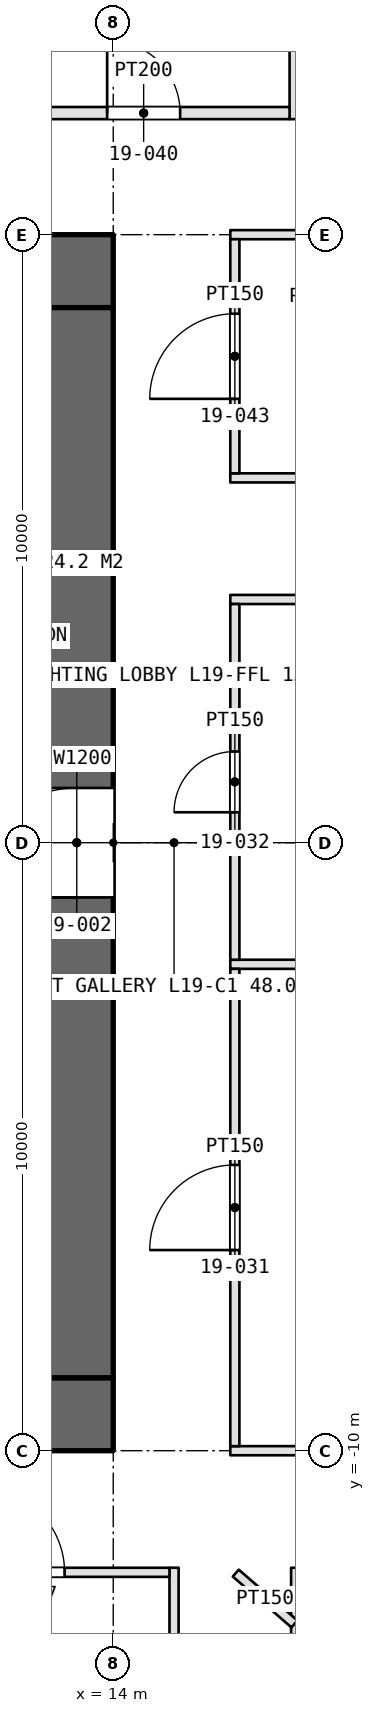
"""IFC4 building model, lengths in metres.
Left out: names, types, materials, properties, quantities, classifications, styles, units other than length and angle.
Written with IfcOpenShell. Run it as: python <this file> out.ifc"""

import sys

from ifc_helpers import new_model, si_unit, direction, frame, frame_2d, origin, place, context, subcontext, project, spatial, rectangle, extrude, element, fill, save


model = new_model("IFC4")
c1 = context("Model", 3, precision=1e-05, world=origin(), true_north=direction((0.0, 1.0)))
c2 = subcontext(c1, "Body", "Model", "MODEL_VIEW")
j1 = project(units=[si_unit("LENGTHUNIT", "METRE"), si_unit("PLANEANGLEUNIT", "RADIAN")], contexts=[c1])
p1 = place(None, origin())
s1 = spatial("IfcSite", under=j1, at=p1, CompositionType="ELEMENT")
p2 = place(p1, origin())
s2 = spatial("IfcBuilding", under=s1, at=p2, CompositionType="ELEMENT")
p3 = place(p2, frame((0.0, 0.0, 95.0)))
s3 = spatial("IfcBuildingStorey", under=s2, at=p3, CompositionType="ELEMENT", Elevation=95.0)
p4 = place(p3, frame((-14.0, -9.4, 0.0), z_axis=(0.0, 0.0, 1.0), x_axis=(1.0, 0.0, 0.0)))
e1 = element("IfcWall", 1, at=p4, inside=s3, PredefinedType="SHEAR", context=c2, shape_type="SweptSolid", body=[
    extrude(rectangle(XDim=28.0, YDim=1.2, at=frame_2d((14.0, 0.0))), origin(), (0.0, 0.0, 1.0), 5.0),
])
p5 = place(p4, frame((13.1, 0.0, 0.0)))
e2 = element("IfcOpeningElement", 2, at=p5, cuts=e1, PredefinedType="OPENING", context=c2, shape_type="SweptSolid", body=[
    extrude(rectangle(XDim=1.8, YDim=2.4, at=frame_2d((0.9, 1.2))), frame((0.0, 0.61, 0.0), z_axis=(0.0, -1.0, 0.0), x_axis=(1.0, 0.0, 0.0)), (0.0, 0.0, 1.0), 1.22),
])
p6 = place(p4, frame((22.9, 0.0, 0.0)))
e3 = element("IfcOpeningElement", 3, at=p6, cuts=e1, PredefinedType="OPENING", context=c2, shape_type="SweptSolid", body=[
    extrude(rectangle(XDim=2.2, YDim=2.7, at=frame_2d((1.1, 1.35))), frame((0.0, 0.61, 0.0), z_axis=(0.0, -1.0, 0.0), x_axis=(1.0, 0.0, 0.0)), (0.0, 0.0, 1.0), 1.22),
])
p7 = place(p3, frame((14.0, 9.4, 0.0), z_axis=(0.0, 0.0, 1.0), x_axis=(-1.0, 0.0, 0.0)))
e4 = element("IfcWall", 4, at=p7, inside=s3, PredefinedType="SHEAR", context=c2, shape_type="SweptSolid", body=[
    extrude(rectangle(XDim=28.0, YDim=1.2, at=frame_2d((14.0, 0.0))), origin(), (0.0, 0.0, 1.0), 5.0),
])
p8 = place(p7, frame((24.0, 0.0, 0.0)))
e5 = element("IfcOpeningElement", 5, at=p8, cuts=e4, PredefinedType="OPENING", context=c2, shape_type="SweptSolid", body=[
    extrude(rectangle(XDim=1.0, YDim=2.4, at=frame_2d((0.5, 1.2))), frame((0.0, 0.61, 0.0), z_axis=(0.0, -1.0, 0.0), x_axis=(1.0, 0.0, 0.0)), (0.0, 0.0, 1.0), 1.22),
])
p9 = place(p7, frame((13.1, 0.0, 0.0)))
e6 = element("IfcOpeningElement", 6, at=p9, cuts=e4, PredefinedType="OPENING", context=c2, shape_type="SweptSolid", body=[
    extrude(rectangle(XDim=1.8, YDim=2.4, at=frame_2d((0.9, 1.2))), frame((0.0, 0.61, 0.0), z_axis=(0.0, -1.0, 0.0), x_axis=(1.0, 0.0, 0.0)), (0.0, 0.0, 1.0), 1.22),
])
p10 = place(p3, frame((13.4, -8.8, 0.0), z_axis=(0.0, 0.0, 1.0), x_axis=(0.0, 1.0, 0.0)))
e7 = element("IfcWall", 7, at=p10, inside=s3, PredefinedType="SHEAR", context=c2, shape_type="SweptSolid", body=[
    extrude(rectangle(XDim=17.6, YDim=1.2, at=frame_2d((8.8, 0.0))), origin(), (0.0, 0.0, 1.0), 5.0),
])
p11 = place(p10, frame((7.9, 0.0, 0.0)))
e8 = element("IfcOpeningElement", 8, at=p11, cuts=e7, PredefinedType="OPENING", context=c2, shape_type="SweptSolid", body=[
    extrude(rectangle(XDim=1.8, YDim=2.4, at=frame_2d((0.9, 1.2))), frame((0.0, 0.61, 0.0), z_axis=(0.0, -1.0, 0.0), x_axis=(1.0, 0.0, 0.0)), (0.0, 0.0, 1.0), 1.22),
])
p12 = place(p3, frame((15.0, -11.925, 0.0), z_axis=(0.0, 0.0, 1.0), x_axis=(0.0, -1.0, 0.0)))
e9 = element("IfcWall", 9, at=p12, inside=s3, PredefinedType="PARTITIONING", context=c2, shape_type="SweptSolid", body=[
    extrude(rectangle(XDim=8.15, YDim=0.15, at=frame_2d((4.075, 0.0))), origin(), (0.0, 0.0, 1.0), 3.6),
])
p13 = place(p3, frame((10.075, -12.0, 0.0), z_axis=(0.0, 0.0, 1.0), x_axis=(1.0, 0.0, 0.0)))
e10 = element("IfcWall", 10, at=p13, inside=s3, PredefinedType="PARTITIONING", context=c2, shape_type="SweptSolid", body=[
    extrude(rectangle(XDim=4.85, YDim=0.15, at=frame_2d((2.425, 0.0))), origin(), (0.0, 0.0, 1.0), 3.6),
])
p14 = place(p13, frame((1.725, 0.0, 0.0)))
e11 = element("IfcOpeningElement", 11, at=p14, cuts=e10, PredefinedType="OPENING", context=c2, shape_type="SweptSolid", body=[
    extrude(rectangle(XDim=1.4, YDim=2.4, at=frame_2d((0.7, 1.2))), frame((0.0, 0.085, 0.0), z_axis=(0.0, -1.0, 0.0), x_axis=(1.0, 0.0, 0.0)), (0.0, 0.0, 1.0), 0.17),
])
for number, where, z_axis, x_axis in (
    (12, (15.925, -10.0, 0.0), (0.0, 0.0, 1.0), (1.0, 0.0, 0.0)),
    (13, (15.925, -2.0, 0.0), (0.0, 0.0, 1.0), (1.0, 0.0, 0.0)),
    (14, (15.925, 4.0, 0.0), (0.0, 0.0, 1.0), (1.0, 0.0, 0.0)),
):
    element("IfcWall", number, at=place(p3, frame(where, z_axis=z_axis, x_axis=x_axis)), inside=s3, PredefinedType="PARTITIONING", context=c2, shape_type="SweptSolid", body=[
        extrude(rectangle(XDim=9.15, YDim=0.15, at=frame_2d((4.575, 0.0))), origin(), (0.0, 0.0, 1.0), 3.6),
    ])
p15 = place(p3, frame((16.0, -9.925, 0.0), z_axis=(0.0, 0.0, 1.0), x_axis=(0.0, 1.0, 0.0)))
e15 = element("IfcWall", 15, at=p15, inside=s3, PredefinedType="PARTITIONING", context=c2, shape_type="SweptSolid", body=[
    extrude(rectangle(XDim=7.85, YDim=0.15, at=frame_2d((3.925, 0.0))), origin(), (0.0, 0.0, 1.0), 3.6),
])
p16 = place(p15, frame((3.225, 0.0, 0.0)))
e16 = element("IfcOpeningElement", 16, at=p16, cuts=e15, PredefinedType="OPENING", context=c2, shape_type="SweptSolid", body=[
    extrude(rectangle(XDim=1.4, YDim=2.4, at=frame_2d((0.7, 1.2))), frame((0.0, 0.085, 0.0), z_axis=(0.0, -1.0, 0.0), x_axis=(1.0, 0.0, 0.0)), (0.0, 0.0, 1.0), 0.17),
])
p17 = place(p3, frame((16.0, -1.925, 0.0), z_axis=(0.0, 0.0, 1.0), x_axis=(0.0, 1.0, 0.0)))
e17 = element("IfcWall", 17, at=p17, inside=s3, PredefinedType="PARTITIONING", context=c2, shape_type="SweptSolid", body=[
    extrude(rectangle(XDim=5.85, YDim=0.15, at=frame_2d((2.925, 0.0))), origin(), (0.0, 0.0, 1.0), 3.6),
])
p18 = place(p17, frame((2.425, 0.0, 0.0)))
e18 = element("IfcOpeningElement", 18, at=p18, cuts=e17, PredefinedType="OPENING", context=c2, shape_type="SweptSolid", body=[
    extrude(rectangle(XDim=1.0, YDim=2.2, at=frame_2d((0.5, 1.1))), frame((0.0, 0.085, 0.0), z_axis=(0.0, -1.0, 0.0), x_axis=(1.0, 0.0, 0.0)), (0.0, 0.0, 1.0), 0.17),
])
p19 = place(p3, frame((17.0, 11.9, 0.0), z_axis=(0.0, 0.0, 1.0), x_axis=(0.0, 1.0, 0.0)))
e19 = element("IfcWall", 19, at=p19, inside=s3, PredefinedType="PARTITIONING", context=c2, shape_type="SweptSolid", body=[
    extrude(rectangle(XDim=5.2, YDim=0.2, at=frame_2d((2.6, 0.0))), origin(), (0.0, 0.0, 1.0), 3.6),
])
p20 = place(p3, frame((12.1, 12.0, 0.0), z_axis=(0.0, 0.0, 1.0), x_axis=(1.0, 0.0, 0.0)))
e20 = element("IfcWall", 20, at=p20, inside=s3, PredefinedType="PARTITIONING", context=c2, shape_type="SweptSolid", body=[
    extrude(rectangle(XDim=4.8, YDim=0.2, at=frame_2d((2.4, 0.0))), origin(), (0.0, 0.0, 1.0), 3.6),
])
p21 = place(p20, frame((1.8, 0.0, 0.0)))
e21 = element("IfcOpeningElement", 21, at=p21, cuts=e20, PredefinedType="OPENING", context=c2, shape_type="SweptSolid", body=[
    extrude(rectangle(XDim=1.2, YDim=2.4, at=frame_2d((0.6, 1.2))), frame((0.0, 0.11, 0.0), z_axis=(0.0, -1.0, 0.0), x_axis=(1.0, 0.0, 0.0)), (0.0, 0.0, 1.0), 0.22),
])
for number, where, z_axis, x_axis in (
    (22, (17.0, -11.925, 0.0), (0.0, 0.0, 1.0), (0.0, -1.0, 0.0)),
    (23, (15.925, 6.0, 0.0), (0.0, 0.0, 1.0), (1.0, 0.0, 0.0)),
    (24, (15.925, 10.0, 0.0), (0.0, 0.0, 1.0), (1.0, 0.0, 0.0)),
):
    element("IfcWall", number, at=place(p3, frame(where, z_axis=z_axis, x_axis=x_axis)), inside=s3, PredefinedType="PARTITIONING", context=c2, shape_type="SweptSolid", body=[
        extrude(rectangle(XDim=5.15, YDim=0.15, at=frame_2d((2.575, 0.0))), origin(), (0.0, 0.0, 1.0), 3.6),
    ])
p22 = place(p3, frame((16.0, 6.075, 0.0), z_axis=(0.0, 0.0, 1.0), x_axis=(0.0, 1.0, 0.0)))
e25 = element("IfcWall", 25, at=p22, inside=s3, PredefinedType="PARTITIONING", context=c2, shape_type="SweptSolid", body=[
    extrude(rectangle(XDim=3.85, YDim=0.15, at=frame_2d((1.925, 0.0))), origin(), (0.0, 0.0, 1.0), 3.6),
])
p23 = place(p22, frame((1.225, 0.0, 0.0)))
e26 = element("IfcOpeningElement", 26, at=p23, cuts=e25, PredefinedType="OPENING", context=c2, shape_type="SweptSolid", body=[
    extrude(rectangle(XDim=1.4, YDim=2.4, at=frame_2d((0.7, 1.2))), frame((0.0, 0.085, 0.0), z_axis=(0.0, -1.0, 0.0), x_axis=(1.0, 0.0, 0.0)), (0.0, 0.0, 1.0), 0.17),
])
p24 = place(p3, frame((16.015, -12.013, 0.0), z_axis=(0.0, 0.0, 1.0), x_axis=(0.755411512729, -0.655250674503, 0.0)))
e27 = element("IfcWall", 27, at=p24, inside=s3, PredefinedType="PARTITIONING", context=c2, shape_type="SweptSolid", body=[
    extrude(rectangle(XDim=1.277, YDim=0.15, at=frame_2d((0.639, 0.0))), origin(), (0.0, 0.0, 1.0), 3.6),
])
p25 = place(p11, origin())
e28 = element("IfcDoor", 28, at=p25, inside=s3, OperationType="DOUBLE_DOOR_SINGLE_SWING", PredefinedType="DOOR", context=c2, shape_type="SweptSolid", body=[
    extrude(rectangle(XDim=1.8, YDim=2.4, at=frame_2d((0.9, 1.2))), frame((0.0, 0.025, 0.0), z_axis=(0.0, -1.0, 0.0), x_axis=(1.0, 0.0, 0.0)), (0.0, 0.0, 1.0), 0.05),
])
fill(e8, e28)
p26 = place(p14, origin())
e29 = element("IfcDoor", 29, at=p26, inside=s3, OperationType="DOUBLE_DOOR_DOUBLE_SWING", PredefinedType="DOOR", context=c2, shape_type="SweptSolid", body=[
    extrude(rectangle(XDim=1.4, YDim=2.4, at=frame_2d((0.7, 1.2))), frame((0.0, 0.025, 0.0), z_axis=(0.0, -1.0, 0.0), x_axis=(1.0, 0.0, 0.0)), (0.0, 0.0, 1.0), 0.05),
])
fill(e11, e29)
p27 = place(p16, origin())
e30 = element("IfcDoor", 30, at=p27, inside=s3, OperationType="DOUBLE_DOOR_DOUBLE_SWING", PredefinedType="DOOR", context=c2, shape_type="SweptSolid", body=[
    extrude(rectangle(XDim=1.4, YDim=2.4, at=frame_2d((0.7, 1.2))), frame((0.0, 0.025, 0.0), z_axis=(0.0, -1.0, 0.0), x_axis=(1.0, 0.0, 0.0)), (0.0, 0.0, 1.0), 0.05),
])
fill(e16, e30)
p28 = place(p18, origin())
e31 = element("IfcDoor", 31, at=p28, inside=s3, OperationType="SINGLE_SWING_LEFT", PredefinedType="DOOR", context=c2, shape_type="SweptSolid", body=[
    extrude(rectangle(XDim=1.0, YDim=2.2, at=frame_2d((0.5, 1.1))), frame((0.0, 0.025, 0.0), z_axis=(0.0, -1.0, 0.0), x_axis=(1.0, 0.0, 0.0)), (0.0, 0.0, 1.0), 0.05),
])
fill(e18, e31)
p29 = place(p21, origin())
e32 = element("IfcDoor", 32, at=p29, inside=s3, OperationType="SINGLE_SWING_LEFT", PredefinedType="DOOR", context=c2, shape_type="SweptSolid", body=[
    extrude(rectangle(XDim=1.2, YDim=2.4, at=frame_2d((0.6, 1.2))), frame((0.0, 0.025, 0.0), z_axis=(0.0, -1.0, 0.0), x_axis=(1.0, 0.0, 0.0)), (0.0, 0.0, 1.0), 0.05),
])
fill(e21, e32)
p30 = place(p23, origin())
e33 = element("IfcDoor", 33, at=p30, inside=s3, OperationType="DOUBLE_DOOR_DOUBLE_SWING", PredefinedType="DOOR", context=c2, shape_type="SweptSolid", body=[
    extrude(rectangle(XDim=1.4, YDim=2.4, at=frame_2d((0.7, 1.2))), frame((0.0, 0.025, 0.0), z_axis=(0.0, -1.0, 0.0), x_axis=(1.0, 0.0, 0.0)), (0.0, 0.0, 1.0), 0.05),
])
fill(e26, e33)
save(model, sys.argv[1])
